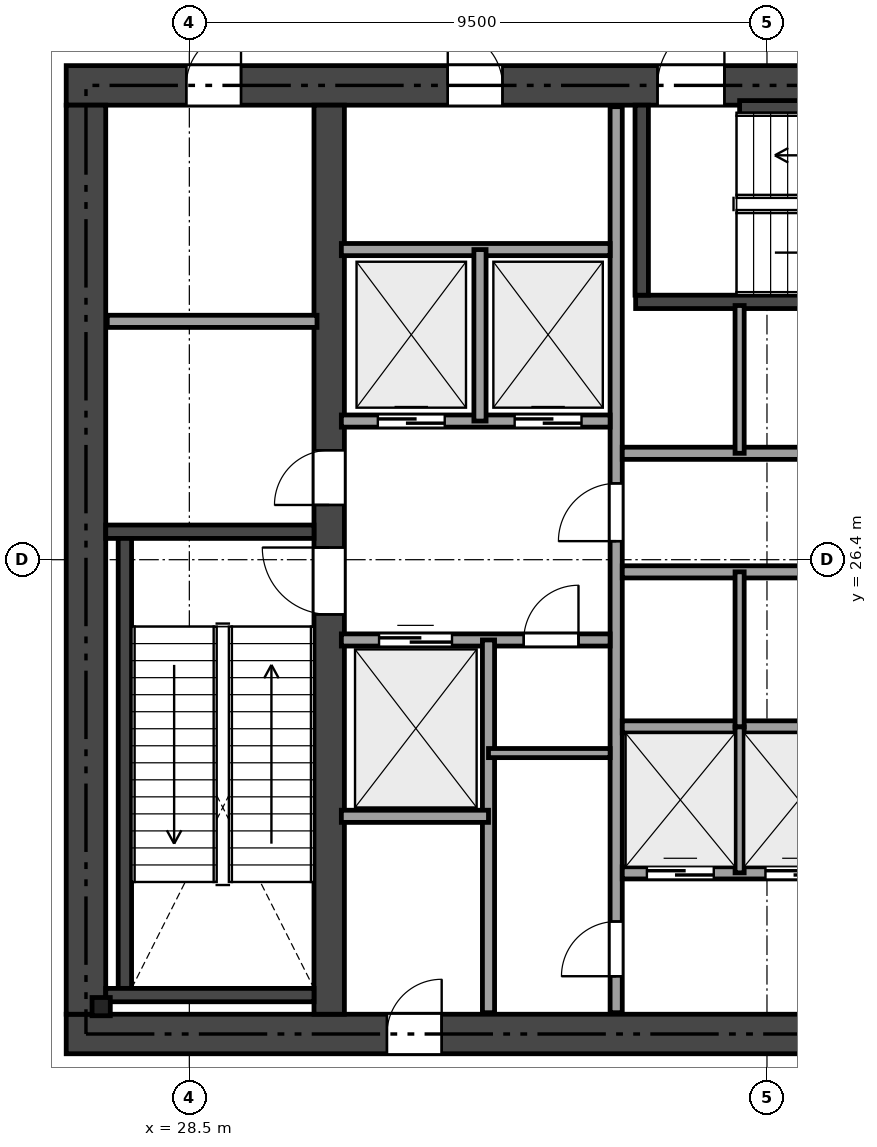
"""IFC4 building model, lengths in metres.
Left out: names, types, materials, properties, quantities, classifications, styles, units other than length and angle.
Written with IfcOpenShell. Run it as: python <this file> out.ifc"""

import sys

from ifc_helpers import new_model, si_unit, direction, frame, frame_2d, origin, origin_2d, place, context, subcontext, project, spatial, rectangle, i_section, extrude, element, fill, save


model = new_model("IFC4")
c1 = context("Model", 3, precision=1e-05, world=origin(), true_north=direction((0.0, 1.0)))
c2 = subcontext(c1, "Body", "Model", "MODEL_VIEW")
j1 = project(units=[si_unit("LENGTHUNIT", "METRE"), si_unit("PLANEANGLEUNIT", "RADIAN")], contexts=[c1])
p1 = place(None, origin())
s1 = spatial("IfcSite", under=j1, at=p1, CompositionType="ELEMENT")
p2 = place(p1, origin())
s2 = spatial("IfcBuilding", under=s1, at=p2, CompositionType="ELEMENT")
p3 = place(p2, frame((0.0, 0.0, 16.2)))
s3 = spatial("IfcBuildingStorey", under=s2, at=p3, CompositionType="ELEMENT", Elevation=16.2)
p4 = place(p3, frame((26.475, 18.6, 0.0), z_axis=(0.0, 0.0, 1.0), x_axis=(1.0, 0.0, 0.0)))
e1 = element("IfcWall", 1, at=p4, inside=s3, PredefinedType="SHEAR", context=c2, shape_type="SweptSolid", body=[
    extrude(rectangle(XDim=21.45, YDim=0.65, at=frame_2d((10.725, 0.0))), origin(), (0.0, 0.0, 1.0), 4.98),
])
p5 = place(p4, frame((12.45, 0.0, 0.0)))
e2 = element("IfcOpeningElement", 2, at=p5, cuts=e1, PredefinedType="OPENING", context=c2, shape_type="SweptSolid", body=[
    extrude(rectangle(XDim=1.15, YDim=2.15, at=frame_2d((0.575, 1.075))), frame((0.0, 0.335, 0.0), z_axis=(0.0, -1.0, 0.0), x_axis=(1.0, 0.0, 0.0)), (0.0, 0.0, 1.0), 0.67),
])
p6 = place(p4, frame((5.275, 0.0, 0.0)))
e3 = element("IfcOpeningElement", 3, at=p6, cuts=e1, PredefinedType="OPENING", context=c2, shape_type="SweptSolid", body=[
    extrude(rectangle(XDim=0.9, YDim=2.1, at=frame_2d((0.45, 1.05))), frame((0.0, 0.335, 0.0), z_axis=(0.0, -1.0, 0.0), x_axis=(1.0, 0.0, 0.0)), (0.0, 0.0, 1.0), 0.67),
])
p7 = place(p3, frame((26.475, 34.2, 0.0), z_axis=(0.0, 0.0, 1.0), x_axis=(1.0, 0.0, 0.0)))
e4 = element("IfcWall", 4, at=p7, inside=s3, PredefinedType="SHEAR", context=c2, shape_type="SweptSolid", body=[
    extrude(rectangle(XDim=21.45, YDim=0.65, at=frame_2d((10.725, 0.0))), origin(), (0.0, 0.0, 1.0), 4.98),
])
p8 = place(p7, frame((9.725, 0.0, 0.0)))
e5 = element("IfcOpeningElement", 5, at=p8, cuts=e4, PredefinedType="OPENING", context=c2, shape_type="SweptSolid", body=[
    extrude(rectangle(XDim=1.1, YDim=2.15, at=frame_2d((0.55, 1.075))), frame((0.0, 0.335, 0.0), z_axis=(0.0, -1.0, 0.0), x_axis=(1.0, 0.0, 0.0)), (0.0, 0.0, 1.0), 0.67),
])
p9 = place(p7, frame((1.975, 0.0, 0.0)))
e6 = element("IfcOpeningElement", 6, at=p9, cuts=e4, PredefinedType="OPENING", context=c2, shape_type="SweptSolid", body=[
    extrude(rectangle(XDim=0.9, YDim=2.1, at=frame_2d((0.45, 1.05))), frame((0.0, 0.335, 0.0), z_axis=(0.0, -1.0, 0.0), x_axis=(1.0, 0.0, 0.0)), (0.0, 0.0, 1.0), 0.67),
])
p10 = place(p7, frame((6.275, 0.0, 0.0)))
e7 = element("IfcOpeningElement", 7, at=p10, cuts=e4, PredefinedType="OPENING", context=c2, shape_type="SweptSolid", body=[
    extrude(rectangle(XDim=0.9, YDim=2.1, at=frame_2d((0.45, 1.05))), frame((0.0, 0.335, 0.0), z_axis=(0.0, -1.0, 0.0), x_axis=(1.0, 0.0, 0.0)), (0.0, 0.0, 1.0), 0.67),
])
p11 = place(p3, frame((26.8, 18.925, 0.0), z_axis=(0.0, 0.0, 1.0), x_axis=(0.0, 1.0, 0.0)))
e8 = element("IfcWall", 8, at=p11, inside=s3, PredefinedType="SHEAR", context=c2, shape_type="SweptSolid", body=[
    extrude(rectangle(XDim=14.95, YDim=0.65, at=frame_2d((7.475, 0.0))), origin(), (0.0, 0.0, 1.0), 4.98),
])
p12 = place(p3, frame((30.8, 18.925, 0.0), z_axis=(0.0, 0.0, 1.0), x_axis=(0.0, 1.0, 0.0)))
e9 = element("IfcWall", 9, at=p12, inside=s3, PredefinedType="SHEAR", context=c2, shape_type="SweptSolid", body=[
    extrude(rectangle(XDim=14.95, YDim=0.5, at=frame_2d((7.475, 0.0))), origin(), (0.0, 0.0, 1.0), 4.98),
])
p13 = place(p12, frame((6.575, 0.0, 0.0)))
e10 = element("IfcOpeningElement", 10, at=p13, cuts=e9, PredefinedType="OPENING", context=c2, shape_type="SweptSolid", body=[
    extrude(rectangle(XDim=1.1, YDim=2.15, at=frame_2d((0.55, 1.075))), frame((0.0, 0.26, 0.0), z_axis=(0.0, -1.0, 0.0), x_axis=(1.0, 0.0, 0.0)), (0.0, 0.0, 1.0), 0.52),
])
p14 = place(p12, frame((8.375, 0.0, 0.0)))
e11 = element("IfcOpeningElement", 11, at=p14, cuts=e9, PredefinedType="OPENING", context=c2, shape_type="SweptSolid", body=[
    extrude(rectangle(XDim=0.9, YDim=2.1, at=frame_2d((0.45, 1.05))), frame((0.0, 0.26, 0.0), z_axis=(0.0, -1.0, 0.0), x_axis=(1.0, 0.0, 0.0)), (0.0, 0.0, 1.0), 0.52),
])
p15 = place(p3, frame((27.125, 26.86, 0.0), z_axis=(0.0, 0.0, 1.0), x_axis=(1.0, 0.0, 0.0)))
e12 = element("IfcWall", 12, at=p15, inside=s3, PredefinedType="SHEAR", context=c2, shape_type="SweptSolid", body=[
    extrude(rectangle(XDim=3.425, YDim=0.22, at=frame_2d((1.712, 0.0))), origin(), (0.0, 0.0, 1.0), 4.98),
])
p16 = place(p3, frame((27.44, 19.35, 0.0), z_axis=(0.0, 0.0, 1.0), x_axis=(0.0, 1.0, 0.0)))
e13 = element("IfcWall", 13, at=p16, inside=s3, PredefinedType="SHEAR", context=c2, shape_type="SweptSolid", body=[
    extrude(rectangle(XDim=7.4, YDim=0.22, at=frame_2d((3.7, 0.0))), origin(), (0.0, 0.0, 1.0), 4.98),
])
p17 = place(p3, frame((27.125, 19.24, 0.0), z_axis=(0.0, 0.0, 1.0), x_axis=(1.0, 0.0, 0.0)))
e14 = element("IfcWall", 14, at=p17, inside=s3, PredefinedType="SHEAR", context=c2, shape_type="SweptSolid", body=[
    extrude(rectangle(XDim=3.425, YDim=0.22, at=frame_2d((1.712, 0.0))), origin(), (0.0, 0.0, 1.0), 4.98),
])
p18 = place(p3, frame((35.84, 30.64, 0.0), z_axis=(0.0, 0.0, 1.0), x_axis=(1.0, 0.0, 0.0)))
e15 = element("IfcWall", 15, at=p18, inside=s3, PredefinedType="SHEAR", context=c2, shape_type="SweptSolid", body=[
    extrude(rectangle(XDim=7.61, YDim=0.22, at=frame_2d((3.805, 0.0))), origin(), (0.0, 0.0, 1.0), 4.98),
])
p19 = place(p3, frame((35.94, 30.75, 0.0), z_axis=(0.0, 0.0, 1.0), x_axis=(0.0, 1.0, 0.0)))
e16 = element("IfcWall", 16, at=p19, inside=s3, PredefinedType="SHEAR", context=c2, shape_type="SweptSolid", body=[
    extrude(rectangle(XDim=3.125, YDim=0.22, at=frame_2d((1.562, 0.0))), origin(), (0.0, 0.0, 1.0), 4.98),
])
p20 = place(p3, frame((37.55, 33.84, 0.0), z_axis=(0.0, 0.0, 1.0), x_axis=(1.0, 0.0, 0.0)))
e17 = element("IfcWall", 17, at=p20, inside=s3, PredefinedType="SHEAR", context=c2, shape_type="SweptSolid", body=[
    extrude(rectangle(XDim=5.9, YDim=0.22, at=frame_2d((2.95, 0.0))), origin(), (0.0, 0.0, 1.0), 4.98),
])
p21 = place(p3, frame((27.05, 19.05, 0.0), z_axis=(0.0, 0.0, 1.0), x_axis=(1.0, 0.0, 0.0)))
e18 = element("IfcColumn", 18, at=p21, inside=s3, PredefinedType="PILASTER", context=c2, shape_type="SweptSolid", body=[
    extrude(i_section(OverallWidth=0.3, OverallDepth=0.3, WebThickness=0.011, FlangeThickness=0.019, at=origin_2d()), origin(), (0.0, 0.0, 1.0), 4.98),
])
p22 = place(p3, frame((27.15, 30.32, 0.0), z_axis=(0.0, 0.0, 1.0), x_axis=(1.0, 0.0, 0.0)))
e19 = element("IfcWall", 19, at=p22, inside=s3, PredefinedType="SOLIDWALL", context=c2, shape_type="SweptSolid", body=[
    extrude(rectangle(XDim=3.45, YDim=0.2, at=frame_2d((1.725, 0.0))), origin(), (0.0, 0.0, 1.0), 4.98),
])
p23 = place(p3, frame((35.52, 18.95, 0.0), z_axis=(0.0, 0.0, 1.0), x_axis=(0.0, 1.0, 0.0)))
e20 = element("IfcWall", 20, at=p23, inside=s3, PredefinedType="SOLIDWALL", context=c2, shape_type="SweptSolid", body=[
    extrude(rectangle(XDim=14.9, YDim=0.2, at=frame_2d((7.45, 0.0))), origin(), (0.0, 0.0, 1.0), 4.501),
])
p24 = place(p23, frame((7.755, 0.0, 0.0)))
e21 = element("IfcOpeningElement", 21, at=p24, cuts=e20, PredefinedType="OPENING", context=c2, shape_type="SweptSolid", body=[
    extrude(rectangle(XDim=0.95, YDim=2.15, at=frame_2d((0.475, 1.075))), frame((0.0, 0.11, 0.0), z_axis=(0.0, -1.0, 0.0), x_axis=(1.0, 0.0, 0.0)), (0.0, 0.0, 1.0), 0.22),
])
p25 = place(p23, frame((0.6, 0.0, 0.0)))
e22 = element("IfcOpeningElement", 22, at=p25, cuts=e20, PredefinedType="OPENING", context=c2, shape_type="SweptSolid", body=[
    extrude(rectangle(XDim=0.9, YDim=2.1, at=frame_2d((0.45, 1.05))), frame((0.0, 0.11, 0.0), z_axis=(0.0, -1.0, 0.0), x_axis=(1.0, 0.0, 0.0)), (0.0, 0.0, 1.0), 0.22),
])
p26 = place(p3, frame((31.0, 28.68, 0.0), z_axis=(0.0, 0.0, 1.0), x_axis=(1.0, 0.0, 0.0)))
e23 = element("IfcWall", 23, at=p26, inside=s3, PredefinedType="SOLIDWALL", context=c2, shape_type="SweptSolid", body=[
    extrude(rectangle(XDim=4.42, YDim=0.2, at=frame_2d((2.21, 0.0))), origin(), (0.0, 0.0, 1.0), 4.98),
])
p27 = place(p26, frame((0.6, 0.0, 0.0)))
e24 = element("IfcOpeningElement", 24, at=p27, cuts=e23, PredefinedType="OPENING", context=c2, shape_type="SweptSolid", body=[
    extrude(rectangle(XDim=1.1, YDim=2.15, at=frame_2d((0.55, 1.075))), frame((0.0, 0.11, 0.0), z_axis=(0.0, -1.0, 0.0), x_axis=(1.0, 0.0, 0.0)), (0.0, 0.0, 1.0), 0.22),
])
p28 = place(p26, frame((2.85, 0.0, 0.0)))
e25 = element("IfcOpeningElement", 25, at=p28, cuts=e23, PredefinedType="OPENING", context=c2, shape_type="SweptSolid", body=[
    extrude(rectangle(XDim=1.1, YDim=2.15, at=frame_2d((0.55, 1.075))), frame((0.0, 0.11, 0.0), z_axis=(0.0, -1.0, 0.0), x_axis=(1.0, 0.0, 0.0)), (0.0, 0.0, 1.0), 0.22),
])
p29 = place(p3, frame((31.0, 31.5, 0.0), z_axis=(0.0, 0.0, 1.0), x_axis=(1.0, 0.0, 0.0)))
e26 = element("IfcWall", 26, at=p29, inside=s3, PredefinedType="SOLIDWALL", context=c2, shape_type="SweptSolid", body=[
    extrude(rectangle(XDim=4.42, YDim=0.2, at=frame_2d((2.21, 0.0))), origin(), (0.0, 0.0, 1.0), 4.98),
])
p30 = place(p3, frame((33.28, 28.68, 0.0), z_axis=(0.0, 0.0, 1.0), x_axis=(0.0, 1.0, 0.0)))
e27 = element("IfcWall", 27, at=p30, inside=s3, PredefinedType="SOLIDWALL", context=c2, shape_type="SweptSolid", body=[
    extrude(rectangle(XDim=2.82, YDim=0.2, at=frame_2d((1.41, 0.0))), origin(), (0.0, 0.0, 1.0), 4.98),
])
p31 = place(p3, frame((31.0, 25.08, 0.0), z_axis=(0.0, 0.0, 1.0), x_axis=(1.0, 0.0, 0.0)))
e28 = element("IfcWall", 28, at=p31, inside=s3, PredefinedType="SOLIDWALL", context=c2, shape_type="SweptSolid", body=[
    extrude(rectangle(XDim=4.42, YDim=0.2, at=frame_2d((2.21, 0.0))), origin(), (0.0, 0.0, 1.0), 4.98),
])
p32 = place(p31, frame((3.0, 0.0, 0.0)))
e29 = element("IfcOpeningElement", 29, at=p32, cuts=e28, PredefinedType="OPENING", context=c2, shape_type="SweptSolid", body=[
    extrude(rectangle(XDim=0.9, YDim=2.1, at=frame_2d((0.45, 1.05))), frame((0.0, 0.11, 0.0), z_axis=(0.0, -1.0, 0.0), x_axis=(1.0, 0.0, 0.0)), (0.0, 0.0, 1.0), 0.22),
])
p33 = place(p31, frame((0.62, 0.0, 0.0)))
e30 = element("IfcOpeningElement", 30, at=p33, cuts=e28, PredefinedType="OPENING", context=c2, shape_type="SweptSolid", body=[
    extrude(rectangle(XDim=1.2, YDim=2.15, at=frame_2d((0.6, 1.075))), frame((0.0, 0.11, 0.0), z_axis=(0.0, -1.0, 0.0), x_axis=(1.0, 0.0, 0.0)), (0.0, 0.0, 1.0), 0.22),
])
p34 = place(p3, frame((33.42, 18.95, 0.0), z_axis=(0.0, 0.0, 1.0), x_axis=(0.0, 1.0, 0.0)))
e31 = element("IfcWall", 31, at=p34, inside=s3, PredefinedType="SOLIDWALL", context=c2, shape_type="SweptSolid", body=[
    extrude(rectangle(XDim=6.13, YDim=0.2, at=frame_2d((3.065, 0.0))), origin(), (0.0, 0.0, 1.0), 4.501),
])
p35 = place(p3, frame((31.0, 22.18, 0.0), z_axis=(0.0, 0.0, 1.0), x_axis=(1.0, 0.0, 0.0)))
e32 = element("IfcWall", 32, at=p35, inside=s3, PredefinedType="SOLIDWALL", context=c2, shape_type="SweptSolid", body=[
    extrude(rectangle(XDim=2.42, YDim=0.2, at=frame_2d((1.21, 0.0))), origin(), (0.0, 0.0, 1.0), 4.98),
])
p36 = place(p3, frame((33.42, 23.22, 0.0), z_axis=(0.0, 0.0, 1.0), x_axis=(1.0, 0.0, 0.0)))
e33 = element("IfcWall", 33, at=p36, inside=s3, PredefinedType="PARTITIONING", context=c2, shape_type="SweptSolid", body=[
    extrude(rectangle(XDim=2.0, YDim=0.15, at=frame_2d((1.0, 0.0))), origin(), (0.0, 0.0, 1.0), 4.98),
])
for number, where, z_axis, x_axis in (
    (34, (35.62, 28.15, 0.0), (0.0, 0.0, 1.0), (1.0, 0.0, 0.0)),
    (35, (35.62, 26.2, 0.0), (0.0, 0.0, 1.0), (1.0, 0.0, 0.0)),
):
    element("IfcWall", number, at=place(p3, frame(where, z_axis=z_axis, x_axis=x_axis)), inside=s3, PredefinedType="SOLIDWALL", context=c2, shape_type="SweptSolid", body=[
        extrude(rectangle(XDim=7.88, YDim=0.2, at=frame_2d((3.94, 0.0))), origin(), (0.0, 0.0, 1.0), 4.98),
    ])
p37 = place(p3, frame((35.62, 23.65, 0.0), z_axis=(0.0, 0.0, 1.0), x_axis=(1.0, 0.0, 0.0)))
e36 = element("IfcWall", 36, at=p37, inside=s3, PredefinedType="SOLIDWALL", context=c2, shape_type="SweptSolid", body=[
    extrude(rectangle(XDim=7.88, YDim=0.2, at=frame_2d((3.94, 0.0))), origin(), (0.0, 0.0, 1.0), 4.501),
])
p38 = place(p3, frame((35.62, 21.25, 0.0), z_axis=(0.0, 0.0, 1.0), x_axis=(1.0, 0.0, 0.0)))
e37 = element("IfcWall", 37, at=p38, inside=s3, PredefinedType="SOLIDWALL", context=c2, shape_type="SweptSolid", body=[
    extrude(rectangle(XDim=7.88, YDim=0.2, at=frame_2d((3.94, 0.0))), origin(), (0.0, 0.0, 1.0), 4.98),
])
p39 = place(p38, frame((0.405, 0.0, 0.0)))
e38 = element("IfcOpeningElement", 38, at=p39, cuts=e37, PredefinedType="OPENING", context=c2, shape_type="SweptSolid", body=[
    extrude(rectangle(XDim=1.1, YDim=2.15, at=frame_2d((0.55, 1.075))), frame((0.0, 0.11, 0.0), z_axis=(0.0, -1.0, 0.0), x_axis=(1.0, 0.0, 0.0)), (0.0, 0.0, 1.0), 0.22),
])
p40 = place(p38, frame((2.355, 0.0, 0.0)))
e39 = element("IfcOpeningElement", 39, at=p40, cuts=e37, PredefinedType="OPENING", context=c2, shape_type="SweptSolid", body=[
    extrude(rectangle(XDim=1.1, YDim=2.15, at=frame_2d((0.55, 1.075))), frame((0.0, 0.11, 0.0), z_axis=(0.0, -1.0, 0.0), x_axis=(1.0, 0.0, 0.0)), (0.0, 0.0, 1.0), 0.22),
])
p41 = place(p38, frame((4.305, 0.0, 0.0)))
e40 = element("IfcOpeningElement", 40, at=p41, cuts=e37, PredefinedType="OPENING", context=c2, shape_type="SweptSolid", body=[
    extrude(rectangle(XDim=1.1, YDim=2.15, at=frame_2d((0.55, 1.075))), frame((0.0, 0.11, 0.0), z_axis=(0.0, -1.0, 0.0), x_axis=(1.0, 0.0, 0.0)), (0.0, 0.0, 1.0), 0.22),
])
p42 = place(p38, frame((6.255, 0.0, 0.0)))
e41 = element("IfcOpeningElement", 41, at=p42, cuts=e37, PredefinedType="OPENING", context=c2, shape_type="SweptSolid", body=[
    extrude(rectangle(XDim=1.1, YDim=2.15, at=frame_2d((0.55, 1.075))), frame((0.0, 0.11, 0.0), z_axis=(0.0, -1.0, 0.0), x_axis=(1.0, 0.0, 0.0)), (0.0, 0.0, 1.0), 0.22),
])
p43 = place(p3, frame((37.55, 28.15, 0.0), z_axis=(0.0, 0.0, 1.0), x_axis=(0.0, 1.0, 0.0)))
e42 = element("IfcWall", 42, at=p43, inside=s3, PredefinedType="PARTITIONING", context=c2, shape_type="SweptSolid", body=[
    extrude(rectangle(XDim=2.43, YDim=0.15, at=frame_2d((1.215, 0.0))), origin(), (0.0, 0.0, 1.0), 4.98),
])
p44 = place(p3, frame((37.55, 23.65, 0.0), z_axis=(0.0, 0.0, 1.0), x_axis=(0.0, 1.0, 0.0)))
e43 = element("IfcWall", 43, at=p44, inside=s3, PredefinedType="PARTITIONING", context=c2, shape_type="SweptSolid", body=[
    extrude(rectangle(XDim=2.55, YDim=0.15, at=frame_2d((1.275, 0.0))), origin(), (0.0, 0.0, 1.0), 4.501),
])
p45 = place(p3, frame((37.55, 21.25, 0.0), z_axis=(0.0, 0.0, 1.0), x_axis=(0.0, 1.0, 0.0)))
e44 = element("IfcWall", 44, at=p45, inside=s3, PredefinedType="PARTITIONING", context=c2, shape_type="SweptSolid", body=[
    extrude(rectangle(XDim=2.4, YDim=0.15, at=frame_2d((1.2, 0.0))), origin(), (0.0, 0.0, 1.0), 4.501),
])
p46 = place(p13, origin())
e45 = element("IfcDoor", 45, at=p46, inside=s3, OperationType="SINGLE_SWING_RIGHT", PredefinedType="DOOR", context=c2, shape_type="SweptSolid", body=[
    extrude(rectangle(XDim=1.1, YDim=2.15, at=frame_2d((0.55, 1.075))), frame((0.0, 0.025, 0.0), z_axis=(0.0, -1.0, 0.0), x_axis=(1.0, 0.0, 0.0)), (0.0, 0.0, 1.0), 0.05),
])
fill(e10, e45)
p47 = place(p8, origin())
e46 = element("IfcDoor", 46, at=p47, inside=s3, OperationType="SINGLE_SWING_RIGHT", PredefinedType="DOOR", context=c2, shape_type="SweptSolid", body=[
    extrude(rectangle(XDim=1.1, YDim=2.15, at=frame_2d((0.55, 1.075))), frame((0.0, 0.025, 0.0), z_axis=(0.0, -1.0, 0.0), x_axis=(1.0, 0.0, 0.0)), (0.0, 0.0, 1.0), 0.05),
])
fill(e5, e46)
p48 = place(p24, origin())
e47 = element("IfcDoor", 47, at=p48, inside=s3, OperationType="SINGLE_SWING_LEFT", PredefinedType="DOOR", context=c2, shape_type="SweptSolid", body=[
    extrude(rectangle(XDim=0.95, YDim=2.15, at=frame_2d((0.475, 1.075))), frame((0.0, 0.025, 0.0), z_axis=(0.0, -1.0, 0.0), x_axis=(1.0, 0.0, 0.0)), (0.0, 0.0, 1.0), 0.05),
])
fill(e21, e47)
p49 = place(p14, origin())
e48 = element("IfcDoor", 48, at=p49, inside=s3, OperationType="SINGLE_SWING_LEFT", PredefinedType="DOOR", context=c2, shape_type="SweptSolid", body=[
    extrude(rectangle(XDim=0.9, YDim=2.1, at=frame_2d((0.45, 1.05))), frame((0.0, 0.025, 0.0), z_axis=(0.0, -1.0, 0.0), x_axis=(1.0, 0.0, 0.0)), (0.0, 0.0, 1.0), 0.05),
])
fill(e11, e48)
p50 = place(p9, origin())
e49 = element("IfcDoor", 49, at=p50, inside=s3, OperationType="SINGLE_SWING_RIGHT", PredefinedType="DOOR", context=c2, shape_type="SweptSolid", body=[
    extrude(rectangle(XDim=0.9, YDim=2.1, at=frame_2d((0.45, 1.05))), frame((0.0, 0.025, 0.0), z_axis=(0.0, -1.0, 0.0), x_axis=(1.0, 0.0, 0.0)), (0.0, 0.0, 1.0), 0.05),
])
fill(e6, e49)
p51 = place(p10, origin())
e50 = element("IfcDoor", 50, at=p51, inside=s3, OperationType="SINGLE_SWING_LEFT", PredefinedType="DOOR", context=c2, shape_type="SweptSolid", body=[
    extrude(rectangle(XDim=0.9, YDim=2.1, at=frame_2d((0.45, 1.05))), frame((0.0, 0.025, 0.0), z_axis=(0.0, -1.0, 0.0), x_axis=(1.0, 0.0, 0.0)), (0.0, 0.0, 1.0), 0.05),
])
fill(e7, e50)
p52 = place(p6, origin())
e51 = element("IfcDoor", 51, at=p52, inside=s3, OperationType="SINGLE_SWING_RIGHT", PredefinedType="DOOR", context=c2, shape_type="SweptSolid", body=[
    extrude(rectangle(XDim=0.9, YDim=2.1, at=frame_2d((0.45, 1.05))), frame((0.0, 0.025, 0.0), z_axis=(0.0, -1.0, 0.0), x_axis=(1.0, 0.0, 0.0)), (0.0, 0.0, 1.0), 0.05),
])
fill(e3, e51)
p53 = place(p25, origin())
e52 = element("IfcDoor", 52, at=p53, inside=s3, OperationType="SINGLE_SWING_LEFT", PredefinedType="DOOR", context=c2, shape_type="SweptSolid", body=[
    extrude(rectangle(XDim=0.9, YDim=2.1, at=frame_2d((0.45, 1.05))), frame((0.0, 0.025, 0.0), z_axis=(0.0, -1.0, 0.0), x_axis=(1.0, 0.0, 0.0)), (0.0, 0.0, 1.0), 0.05),
])
fill(e22, e52)
p54 = place(p32, origin())
e53 = element("IfcDoor", 53, at=p54, inside=s3, OperationType="SINGLE_SWING_RIGHT", PredefinedType="DOOR", context=c2, shape_type="SweptSolid", body=[
    extrude(rectangle(XDim=0.9, YDim=2.1, at=frame_2d((0.45, 1.05))), frame((0.0, 0.025, 0.0), z_axis=(0.0, -1.0, 0.0), x_axis=(1.0, 0.0, 0.0)), (0.0, 0.0, 1.0), 0.05),
])
fill(e29, e53)
p55 = place(p27, origin())
e54 = element("IfcDoor", 54, at=p55, inside=s3, OperationType="SLIDING_TO_LEFT", PredefinedType="DOOR", context=c2, shape_type="SweptSolid", body=[
    extrude(rectangle(XDim=1.1, YDim=2.15, at=frame_2d((0.55, 1.075))), frame((0.0, 0.025, 0.0), z_axis=(0.0, -1.0, 0.0), x_axis=(1.0, 0.0, 0.0)), (0.0, 0.0, 1.0), 0.05),
])
fill(e24, e54)
p56 = place(p28, origin())
e55 = element("IfcDoor", 55, at=p56, inside=s3, OperationType="SLIDING_TO_LEFT", PredefinedType="DOOR", context=c2, shape_type="SweptSolid", body=[
    extrude(rectangle(XDim=1.1, YDim=2.15, at=frame_2d((0.55, 1.075))), frame((0.0, 0.025, 0.0), z_axis=(0.0, -1.0, 0.0), x_axis=(1.0, 0.0, 0.0)), (0.0, 0.0, 1.0), 0.05),
])
fill(e25, e55)
p57 = place(p33, origin())
e56 = element("IfcDoor", 56, at=p57, inside=s3, OperationType="SLIDING_TO_LEFT", PredefinedType="DOOR", context=c2, shape_type="SweptSolid", body=[
    extrude(rectangle(XDim=1.2, YDim=2.15, at=frame_2d((0.6, 1.075))), frame((0.0, 0.025, 0.0), z_axis=(0.0, -1.0, 0.0), x_axis=(1.0, 0.0, 0.0)), (0.0, 0.0, 1.0), 0.05),
])
fill(e30, e56)
p58 = place(p39, origin())
e57 = element("IfcDoor", 57, at=p58, inside=s3, OperationType="SLIDING_TO_LEFT", PredefinedType="DOOR", context=c2, shape_type="SweptSolid", body=[
    extrude(rectangle(XDim=1.1, YDim=2.15, at=frame_2d((0.55, 1.075))), frame((0.0, 0.025, 0.0), z_axis=(0.0, -1.0, 0.0), x_axis=(1.0, 0.0, 0.0)), (0.0, 0.0, 1.0), 0.05),
])
fill(e38, e57)
p59 = place(p40, origin())
e58 = element("IfcDoor", 58, at=p59, inside=s3, OperationType="SLIDING_TO_LEFT", PredefinedType="DOOR", context=c2, shape_type="SweptSolid", body=[
    extrude(rectangle(XDim=1.1, YDim=2.15, at=frame_2d((0.55, 1.075))), frame((0.0, 0.025, 0.0), z_axis=(0.0, -1.0, 0.0), x_axis=(1.0, 0.0, 0.0)), (0.0, 0.0, 1.0), 0.05),
])
fill(e39, e58)
save(model, sys.argv[1])
